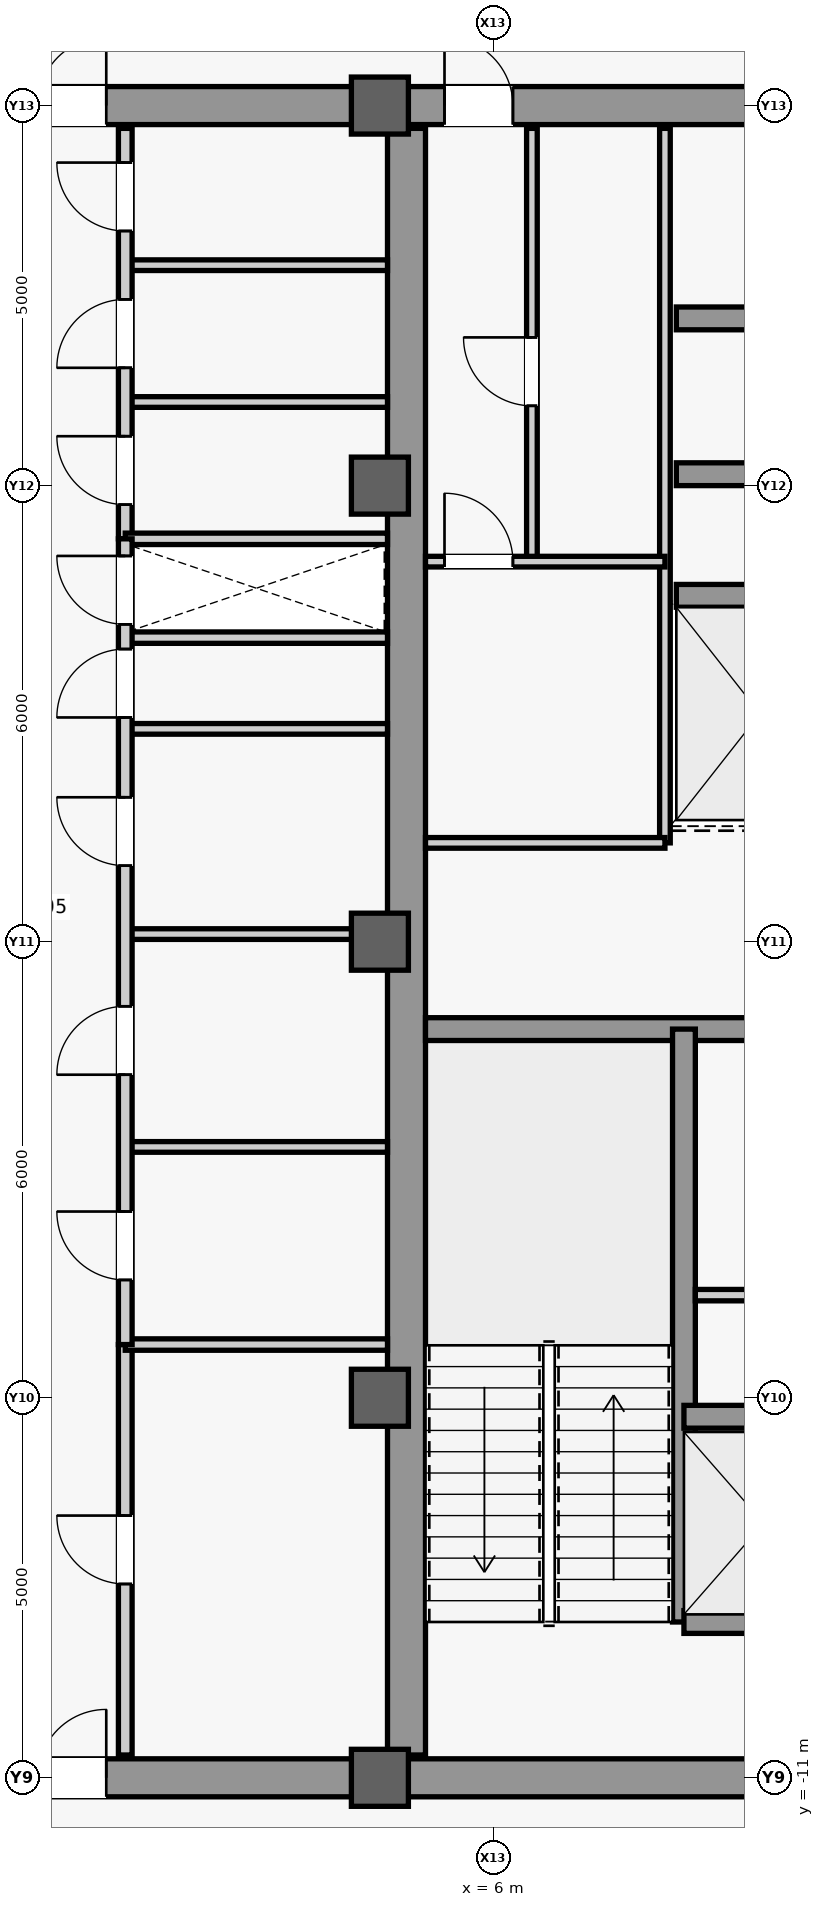
"""IFC4 building model, lengths in metres.
Left out: names, types, materials, properties, quantities, classifications, styles, units other than length and angle.
Written with IfcOpenShell. Run it as: python <this file> out.ifc"""

import sys

from ifc_helpers import new_model, si_unit, direction, frame, frame_2d, origin, origin_2d, place, context, subcontext, project, spatial, rectangle, extrude, source, transform, mapped, element, fill, save


model = new_model("IFC4")
c1 = context("Model", 3, precision=1e-05, world=origin(), true_north=direction((0.0, 1.0)))
c2 = subcontext(c1, "Body", "Model", "MODEL_VIEW")
j1 = project(units=[si_unit("LENGTHUNIT", "METRE"), si_unit("PLANEANGLEUNIT", "RADIAN")], contexts=[c1])
p1 = place(None, origin())
s1 = spatial("IfcSite", under=j1, at=p1, CompositionType="ELEMENT")
p2 = place(p1, origin())
s2 = spatial("IfcBuilding", under=s1, at=p2, CompositionType="ELEMENT")
p3 = place(p2, frame((0.0, 0.0, 380.3)))
s3 = spatial("IfcBuildingStorey", under=s2, at=p3, CompositionType="ELEMENT", Elevation=380.3)
m1 = source(origin(), c2, "Body", "SweptSolid", [
    extrude(rectangle(XDim=21.4, YDim=0.5, at=frame_2d((10.7, 0.0))), origin(), (0.0, 0.0, 1.0), 4.45),
])
p4 = place(p3, frame((4.85, -10.7, 0.0), z_axis=(0.0, 0.0, 1.0), x_axis=(0.0, 1.0, 0.0)))
e1 = element("IfcWall", 1, at=p4, inside=s3, PredefinedType="SHEAR", context=c2, shape_type="MappedRepresentation", body=[
    mapped(m1, transform((0.0, 0.0, 0.0), scale=1.0)),
])
m2 = source(origin(), c2, "Body", "SweptSolid", [
    extrude(rectangle(XDim=5.9, YDim=0.5, at=frame_2d((2.95, 0.0))), origin(), (0.0, 0.0, 1.0), 4.45),
])
p5 = place(p3, frame((4.85, -11.0, 0.0), z_axis=(0.0, 0.0, 1.0), x_axis=(1.0, 0.0, 0.0)))
e2 = element("IfcWall", 2, at=p5, inside=s3, PredefinedType="SHEAR", context=c2, shape_type="MappedRepresentation", body=[
    mapped(m2, transform((0.0, 0.0, 0.0), scale=1.0)),
])
p6 = place(p3, frame((4.85, 11.0, 0.0), z_axis=(0.0, 0.0, 1.0), x_axis=(1.0, 0.0, 0.0)))
e3 = element("IfcWall", 3, at=p6, inside=s3, PredefinedType="SHEAR", context=c2, shape_type="MappedRepresentation", body=[
    mapped(m2, transform((0.0, 0.0, 0.0), scale=1.0)),
])
m3 = source(origin(), c2, "Body", "SweptSolid", [
    extrude(rectangle(XDim=0.9, YDim=2.15, at=frame_2d((0.45, 1.075))), frame((0.0, 0.26, 0.0), z_axis=(0.0, -1.0, 0.0), x_axis=(1.0, 0.0, 0.0)), (0.0, 0.0, 1.0), 0.52),
])
p7 = place(p6, frame((0.5, 0.0, 0.0)))
e4 = element("IfcOpeningElement", 4, at=p7, cuts=e3, PredefinedType="OPENING", context=c2, shape_type="MappedRepresentation", body=[
    mapped(m3, transform((0.0, 0.0, 0.0), scale=1.0)),
])
m4 = source(origin(), c2, "Body", "SweptSolid", [
    extrude(rectangle(XDim=5.65, YDim=0.3, at=frame_2d((2.825, 0.0))), origin(), (0.0, 0.0, 1.0), 4.45),
])
p8 = place(p3, frame((5.1, -1.15, 0.0), z_axis=(0.0, 0.0, 1.0), x_axis=(1.0, 0.0, 0.0)))
e5 = element("IfcWall", 5, at=p8, inside=s3, PredefinedType="SHEAR", context=c2, shape_type="MappedRepresentation", body=[
    mapped(m4, transform((0.0, 0.0, 0.0), scale=1.0)),
])
m5 = source(origin(), c2, "Body", "SweptSolid", [
    extrude(rectangle(XDim=9.2, YDim=0.5, at=frame_2d((4.6, 0.0))), origin(), (0.0, 0.0, 1.0), 4.45),
])
p9 = place(p3, frame((-4.6, -11.0, 0.0), z_axis=(0.0, 0.0, 1.0), x_axis=(1.0, 0.0, 0.0)))
e6 = element("IfcWall", 6, at=p9, inside=s3, PredefinedType="SHEAR", context=c2, shape_type="MappedRepresentation", body=[
    mapped(m5, transform((0.0, 0.0, 0.0), scale=1.0)),
])
m6 = source(origin(), c2, "Body", "SweptSolid", [
    extrude(rectangle(XDim=1.8, YDim=2.25, at=frame_2d((0.9, 1.125))), frame((0.0, 0.26, 0.0), z_axis=(0.0, -1.0, 0.0), x_axis=(1.0, 0.0, 0.0)), (0.0, 0.0, 1.0), 0.52),
])
p10 = place(p9, frame((3.7, 0.0, 0.0)))
e7 = element("IfcOpeningElement", 7, at=p10, cuts=e6, PredefinedType="OPENING", context=c2, shape_type="MappedRepresentation", body=[
    mapped(m6, transform((0.0, 0.0, 0.0), scale=1.0)),
])
p11 = place(p3, frame((-4.6, 11.0, 0.0), z_axis=(0.0, 0.0, 1.0), x_axis=(1.0, 0.0, 0.0)))
e8 = element("IfcWall", 8, at=p11, inside=s3, PredefinedType="SHEAR", context=c2, shape_type="MappedRepresentation", body=[
    mapped(m5, transform((0.0, 0.0, 0.0), scale=1.0)),
])
p12 = place(p11, frame((3.7, 0.0, 0.0)))
e9 = element("IfcOpeningElement", 9, at=p12, cuts=e8, PredefinedType="OPENING", context=c2, shape_type="MappedRepresentation", body=[
    mapped(m6, transform((0.0, 0.0, 0.0), scale=1.0)),
])
m7 = source(origin(), c2, "Body", "SweptSolid", [
    extrude(rectangle(XDim=0.75, YDim=0.75, at=origin_2d()), origin(), (0.0, 0.0, 1.0), 4.8),
])
for number, where, z_axis, x_axis in (
    (10, (4.5, -11.0, 0.0), (0.0, 0.0, 1.0), (1.0, 0.0, 0.0)),
    (11, (4.5, -6.0, 0.0), (0.0, 0.0, 1.0), (1.0, 0.0, 0.0)),
    (12, (4.5, 0.0, 0.0), (0.0, 0.0, 1.0), (1.0, 0.0, 0.0)),
    (13, (4.5, 6.0, 0.0), (0.0, 0.0, 1.0), (1.0, 0.0, 0.0)),
    (14, (4.5, 11.0, 0.0), (0.0, 0.0, 1.0), (1.0, 0.0, 0.0)),
):
    element("IfcColumn", number, at=place(p3, frame(where, z_axis=z_axis, x_axis=x_axis)), inside=s3, PredefinedType="COLUMN", context=c2, shape_type="MappedRepresentation", body=[
        mapped(m7, transform((0.0, 0.0, 0.0), scale=1.0)),
    ])
m8 = source(origin(), c2, "Body", "SweptSolid", [
    extrude(rectangle(XDim=7.8, YDim=0.3, at=frame_2d((3.9, 0.0))), origin(), (0.0, 0.0, 1.0), 4.45),
])
p13 = place(p3, frame((8.5, -8.95, 0.0), z_axis=(0.0, 0.0, 1.0), x_axis=(0.0, 1.0, 0.0)))
e15 = element("IfcWall", 15, at=p13, inside=s3, PredefinedType="SHEAR", context=c2, shape_type="MappedRepresentation", body=[
    mapped(m8, transform((0.0, 0.0, 0.0), scale=1.0)),
])
m9 = source(origin(), c2, "Body", "SweptSolid", [
    extrude(rectangle(XDim=2.2, YDim=0.3, at=frame_2d((1.1, 0.0))), origin(), (0.0, 0.0, 1.0), 4.45),
])
for number, where, z_axis, x_axis in (
    (16, (8.5, -8.95, 0.0), (0.0, 0.0, 1.0), (1.0, 0.0, 0.0)),
    (17, (8.5, -6.25, 0.0), (0.0, 0.0, 1.0), (1.0, 0.0, 0.0)),
):
    element("IfcWall", number, at=place(p3, frame(where, z_axis=z_axis, x_axis=x_axis)), inside=s3, PredefinedType="SHEAR", context=c2, shape_type="MappedRepresentation", body=[
        mapped(m9, transform((0.0, 0.0, 0.0), scale=1.0)),
    ])
m10 = source(origin(), c2, "Body", "SweptSolid", [
    extrude(rectangle(XDim=2.3, YDim=0.3, at=frame_2d((1.15, 0.0))), origin(), (0.0, 0.0, 1.0), 4.45),
])
for number, where, z_axis, x_axis in (
    (18, (8.4, 4.55, 0.0), (0.0, 0.0, 1.0), (1.0, 0.0, 0.0)),
    (19, (8.4, 6.15, 0.0), (0.0, 0.0, 1.0), (1.0, 0.0, 0.0)),
    (20, (8.4, 8.2, 0.0), (0.0, 0.0, 1.0), (1.0, 0.0, 0.0)),
):
    element("IfcWall", number, at=place(p3, frame(where, z_axis=z_axis, x_axis=x_axis)), inside=s3, PredefinedType="SHEAR", context=c2, shape_type="MappedRepresentation", body=[
        mapped(m10, transform((0.0, 0.0, 0.0), scale=1.0)),
    ])
m11 = source(origin(), c2, "Body", "SweptSolid", [
    extrude(rectangle(XDim=2.05, YDim=0.15, at=frame_2d((1.025, 0.0))), origin(), (0.0, 0.0, 1.0), 4.45),
])
p14 = place(p3, frame((8.65, -4.65, 0.0), z_axis=(0.0, 0.0, 1.0), x_axis=(1.0, 0.0, 0.0)))
e21 = element("IfcWall", 21, at=p14, inside=s3, PredefinedType="PARTITIONING", context=c2, shape_type="MappedRepresentation", body=[
    mapped(m11, transform((0.0, 0.0, 0.0), scale=1.0)),
])
m12 = source(origin(), c2, "Body", "SweptSolid", [
    extrude(rectangle(XDim=9.4, YDim=0.14, at=frame_2d((4.7, 0.0))), origin(), (0.0, 0.0, 1.0), 4.45),
])
p15 = place(p3, frame((8.25, 1.3, 0.0), z_axis=(0.0, 0.0, 1.0), x_axis=(0.0, 1.0, 0.0)))
e22 = element("IfcWall", 22, at=p15, inside=s3, PredefinedType="PARTITIONING", context=c2, shape_type="MappedRepresentation", body=[
    mapped(m12, transform((0.0, 0.0, 0.0), scale=1.0)),
])
m13 = source(origin(), c2, "Body", "SweptSolid", [
    extrude(rectangle(XDim=3.15, YDim=0.14, at=frame_2d((1.575, 0.0))), origin(), (0.0, 0.0, 1.0), 4.45),
])
p16 = place(p3, frame((5.1, 1.3, 0.0), z_axis=(0.0, 0.0, 1.0), x_axis=(1.0, 0.0, 0.0)))
e23 = element("IfcWall", 23, at=p16, inside=s3, PredefinedType="PARTITIONING", context=c2, shape_type="MappedRepresentation", body=[
    mapped(m13, transform((0.0, 0.0, 0.0), scale=1.0)),
])
m14 = source(origin(), c2, "Body", "SweptSolid", [
    extrude(rectangle(XDim=5.7, YDim=0.14, at=frame_2d((2.85, 0.0))), origin(), (0.0, 0.0, 1.0), 4.45),
])
p17 = place(p3, frame((6.5, 5.0, 0.0), z_axis=(0.0, 0.0, 1.0), x_axis=(0.0, 1.0, 0.0)))
e24 = element("IfcWall", 24, at=p17, inside=s3, PredefinedType="PARTITIONING", context=c2, shape_type="MappedRepresentation", body=[
    mapped(m14, transform((0.0, 0.0, 0.0), scale=1.0)),
])
m15 = source(origin(), c2, "Body", "SweptSolid", [
    extrude(rectangle(XDim=0.9, YDim=2.15, at=frame_2d((0.45, 1.075))), frame((0.0, 0.08, 0.0), z_axis=(0.0, -1.0, 0.0), x_axis=(1.0, 0.0, 0.0)), (0.0, 0.0, 1.0), 0.16),
])
p18 = place(p17, frame((2.05, 0.0, 0.0)))
e25 = element("IfcOpeningElement", 25, at=p18, cuts=e24, PredefinedType="OPENING", context=c2, shape_type="MappedRepresentation", body=[
    mapped(m15, transform((0.0, 0.0, 0.0), scale=1.0)),
])
p19 = place(p3, frame((5.1, 5.0, 0.0), z_axis=(0.0, 0.0, 1.0), x_axis=(1.0, 0.0, 0.0)))
e26 = element("IfcWall", 26, at=p19, inside=s3, PredefinedType="PARTITIONING", context=c2, shape_type="MappedRepresentation", body=[
    mapped(m13, transform((0.0, 0.0, 0.0), scale=1.0)),
])
p20 = place(p19, frame((0.25, 0.0, 0.0)))
e27 = element("IfcOpeningElement", 27, at=p20, cuts=e26, PredefinedType="OPENING", context=c2, shape_type="MappedRepresentation", body=[
    mapped(m15, transform((0.0, 0.0, 0.0), scale=1.0)),
])
m16 = source(origin(), c2, "Body", "SweptSolid", [
    extrude(rectangle(XDim=3.45, YDim=0.15, at=frame_2d((1.725, 0.0))), origin(), (0.0, 0.0, 1.0), 4.45),
])
p21 = place(p3, frame((1.15, 4.0, 0.0), z_axis=(0.0, 0.0, 1.0), x_axis=(1.0, 0.0, 0.0)))
e28 = element("IfcWall", 28, at=p21, inside=s3, PredefinedType="PARTITIONING", context=c2, shape_type="MappedRepresentation", body=[
    mapped(m16, transform((0.0, 0.0, 0.0), scale=1.0)),
])
m17 = source(origin(), c2, "Body", "SweptSolid", [
    extrude(rectangle(XDim=5.4, YDim=0.18, at=frame_2d((2.7, 0.0))), origin(), (0.0, 0.0, 1.0), 4.45),
])
p22 = place(p3, frame((1.15, -10.7, 0.0), z_axis=(0.0, 0.0, 1.0), x_axis=(0.0, 1.0, 0.0)))
e29 = element("IfcWall", 29, at=p22, inside=s3, PredefinedType="PARTITIONING", context=c2, shape_type="MappedRepresentation", body=[
    mapped(m17, transform((0.0, 0.0, 0.0), scale=1.0)),
])
m18 = source(origin(), c2, "Body", "SweptSolid", [
    extrude(rectangle(XDim=0.9, YDim=2.15, at=frame_2d((0.45, 1.075))), frame((0.0, 0.1, 0.0), z_axis=(0.0, -1.0, 0.0), x_axis=(1.0, 0.0, 0.0)), (0.0, 0.0, 1.0), 0.2),
])
p23 = place(p22, frame((2.25, 0.0, 0.0)))
e30 = element("IfcOpeningElement", 30, at=p23, cuts=e29, PredefinedType="OPENING", context=c2, shape_type="MappedRepresentation", body=[
    mapped(m18, transform((0.0, 0.0, 0.0), scale=1.0)),
])
p24 = place(p3, frame((1.15, -5.3, 0.0), z_axis=(0.0, 0.0, 1.0), x_axis=(1.0, 0.0, 0.0)))
e31 = element("IfcWall", 31, at=p24, inside=s3, PredefinedType="PARTITIONING", context=c2, shape_type="MappedRepresentation", body=[
    mapped(m16, transform((0.0, 0.0, 0.0), scale=1.0)),
])
m19 = source(origin(), c2, "Body", "SweptSolid", [
    extrude(rectangle(XDim=3.45, YDim=0.14, at=frame_2d((1.725, 0.0))), origin(), (0.0, 0.0, 1.0), 4.45),
])
for number, where, z_axis, x_axis in (
    (32, (1.15, 7.1, 0.0), (0.0, 0.0, 1.0), (1.0, 0.0, 0.0)),
    (33, (1.15, 8.9, 0.0), (0.0, 0.0, 1.0), (1.0, 0.0, 0.0)),
):
    element("IfcWall", number, at=place(p3, frame(where, z_axis=z_axis, x_axis=x_axis)), inside=s3, PredefinedType="PARTITIONING", context=c2, shape_type="MappedRepresentation", body=[
        mapped(m19, transform((0.0, 0.0, 0.0), scale=1.0)),
    ])
p25 = place(p3, frame((1.15, 5.3, 0.0), z_axis=(0.0, 0.0, 1.0), x_axis=(0.0, 1.0, 0.0)))
e34 = element("IfcWall", 34, at=p25, inside=s3, PredefinedType="PARTITIONING", context=c2, shape_type="MappedRepresentation", body=[
    mapped(m17, transform((0.0, 0.0, 0.0), scale=1.0)),
])
p26 = place(p25, frame((0.45, 0.0, 0.0)))
e35 = element("IfcOpeningElement", 35, at=p26, cuts=e34, PredefinedType="OPENING", context=c2, shape_type="MappedRepresentation", body=[
    mapped(m18, transform((0.0, 0.0, 0.0), scale=1.0)),
])
p27 = place(p25, frame((2.25, 0.0, 0.0)))
e36 = element("IfcOpeningElement", 36, at=p27, cuts=e34, PredefinedType="OPENING", context=c2, shape_type="MappedRepresentation", body=[
    mapped(m18, transform((0.0, 0.0, 0.0), scale=1.0)),
])
p28 = place(p25, frame((4.05, 0.0, 0.0)))
e37 = element("IfcOpeningElement", 37, at=p28, cuts=e34, PredefinedType="OPENING", context=c2, shape_type="MappedRepresentation", body=[
    mapped(m18, transform((0.0, 0.0, 0.0), scale=1.0)),
])
p29 = place(p3, frame((1.15, 5.3, 0.0), z_axis=(0.0, 0.0, 1.0), x_axis=(1.0, 0.0, 0.0)))
e38 = element("IfcWall", 38, at=p29, inside=s3, PredefinedType="PARTITIONING", context=c2, shape_type="MappedRepresentation", body=[
    mapped(m16, transform((0.0, 0.0, 0.0), scale=1.0)),
])
p30 = place(p3, frame((1.15, -2.7, 0.0), z_axis=(0.0, 0.0, 1.0), x_axis=(1.0, 0.0, 0.0)))
e39 = element("IfcWall", 39, at=p30, inside=s3, PredefinedType="PARTITIONING", context=c2, shape_type="MappedRepresentation", body=[
    mapped(m19, transform((0.0, 0.0, 0.0), scale=1.0)),
])
m20 = source(origin(), c2, "Body", "SweptSolid", [
    extrude(rectangle(XDim=3.45, YDim=0.14, at=frame_2d((1.725, 0.0))), origin(), (0.0, 0.0, 1.0), 3.755),
])
p31 = place(p3, frame((1.15, 0.1, 0.0), z_axis=(0.0, 0.0, 1.0), x_axis=(1.0, 0.0, 0.0)))
e40 = element("IfcWall", 40, at=p31, inside=s3, PredefinedType="PARTITIONING", context=c2, shape_type="MappedRepresentation", body=[
    mapped(m20, transform((0.0, 0.0, 0.0), scale=1.0)),
])
p32 = place(p3, frame((1.15, 2.8, 0.0), z_axis=(0.0, 0.0, 1.0), x_axis=(1.0, 0.0, 0.0)))
e41 = element("IfcWall", 41, at=p32, inside=s3, PredefinedType="PARTITIONING", context=c2, shape_type="MappedRepresentation", body=[
    mapped(m19, transform((0.0, 0.0, 0.0), scale=1.0)),
])
m21 = source(origin(), c2, "Body", "SweptSolid", [
    extrude(rectangle(XDim=10.6, YDim=0.18, at=frame_2d((5.3, 0.0))), origin(), (0.0, 0.0, 1.0), 4.45),
])
p33 = place(p3, frame((1.15, -5.3, 0.0), z_axis=(0.0, 0.0, 1.0), x_axis=(0.0, 1.0, 0.0)))
e42 = element("IfcWall", 42, at=p33, inside=s3, PredefinedType="PARTITIONING", context=c2, shape_type="MappedRepresentation", body=[
    mapped(m21, transform((0.0, 0.0, 0.0), scale=1.0)),
])
p34 = place(p33, frame((0.85, 0.0, 0.0)))
e43 = element("IfcOpeningElement", 43, at=p34, cuts=e42, PredefinedType="OPENING", context=c2, shape_type="MappedRepresentation", body=[
    mapped(m18, transform((0.0, 0.0, 0.0), scale=1.0)),
])
p35 = place(p33, frame((3.55, 0.0, 0.0)))
e44 = element("IfcOpeningElement", 44, at=p35, cuts=e42, PredefinedType="OPENING", context=c2, shape_type="MappedRepresentation", body=[
    mapped(m18, transform((0.0, 0.0, 0.0), scale=1.0)),
])
p36 = place(p33, frame((6.3, 0.0, 0.0)))
e45 = element("IfcOpeningElement", 45, at=p36, cuts=e42, PredefinedType="OPENING", context=c2, shape_type="MappedRepresentation", body=[
    mapped(m18, transform((0.0, 0.0, 0.0), scale=1.0)),
])
p37 = place(p33, frame((8.25, 0.0, 0.0)))
e46 = element("IfcOpeningElement", 46, at=p37, cuts=e42, PredefinedType="OPENING", context=c2, shape_type="MappedRepresentation", body=[
    mapped(m18, transform((0.0, 0.0, 0.0), scale=1.0)),
])
p38 = place(p33, frame((9.475, 0.0, 0.0)))
e47 = element("IfcOpeningElement", 47, at=p38, cuts=e42, PredefinedType="OPENING", context=c2, shape_type="MappedRepresentation", body=[
    mapped(m18, transform((0.0, 0.0, 0.0), scale=1.0)),
])
m22 = source(origin(), c2, "Body", "SweptSolid", [
    extrude(rectangle(XDim=0.9, YDim=2.15, at=frame_2d((0.45, 1.075))), frame((0.0, 0.025, 0.0), z_axis=(0.0, -1.0, 0.0), x_axis=(1.0, 0.0, 0.0)), (0.0, 0.0, 1.0), 0.05),
])
p39 = place(p7, origin())
e48 = element("IfcDoor", 48, at=p39, inside=s3, OperationType="SINGLE_SWING_LEFT", PredefinedType="DOOR", context=c2, shape_type="MappedRepresentation", body=[
    mapped(m22, transform((0.0, 0.0, 0.0), scale=1.0)),
])
fill(e4, e48)
p40 = place(p18, origin())
e49 = element("IfcDoor", 49, at=p40, inside=s3, OperationType="SINGLE_SWING_RIGHT", PredefinedType="DOOR", context=c2, shape_type="MappedRepresentation", body=[
    mapped(m22, transform((0.0, 0.0, 0.0), scale=1.0)),
])
fill(e25, e49)
p41 = place(p20, origin())
e50 = element("IfcDoor", 50, at=p41, inside=s3, OperationType="SINGLE_SWING_LEFT", PredefinedType="DOOR", context=c2, shape_type="MappedRepresentation", body=[
    mapped(m22, transform((0.0, 0.0, 0.0), scale=1.0)),
])
fill(e27, e50)
p42 = place(p23, origin())
e51 = element("IfcDoor", 51, at=p42, inside=s3, OperationType="SINGLE_SWING_RIGHT", PredefinedType="DOOR", context=c2, shape_type="MappedRepresentation", body=[
    mapped(m22, transform((0.0, 0.0, 0.0), scale=1.0)),
])
fill(e30, e51)
m23 = source(origin(), c2, "Body", "SweptSolid", [
    extrude(rectangle(XDim=1.8, YDim=2.25, at=frame_2d((0.9, 1.125))), frame((0.0, 0.025, 0.0), z_axis=(0.0, -1.0, 0.0), x_axis=(1.0, 0.0, 0.0)), (0.0, 0.0, 1.0), 0.05),
])
p43 = place(p10, origin())
e52 = element("IfcDoor", 52, at=p43, inside=s3, OperationType="SINGLE_SWING_LEFT", PredefinedType="DOOR", context=c2, shape_type="MappedRepresentation", body=[
    mapped(m23, transform((0.0, 0.0, 0.0), scale=1.0)),
])
fill(e7, e52)
p44 = place(p26, origin())
e53 = element("IfcDoor", 53, at=p44, inside=s3, OperationType="SINGLE_SWING_RIGHT", PredefinedType="DOOR", context=c2, shape_type="MappedRepresentation", body=[
    mapped(m22, transform((0.0, 0.0, 0.0), scale=1.0)),
])
fill(e35, e53)
p45 = place(p27, origin())
e54 = element("IfcDoor", 54, at=p45, inside=s3, OperationType="SINGLE_SWING_LEFT", PredefinedType="DOOR", context=c2, shape_type="MappedRepresentation", body=[
    mapped(m22, transform((0.0, 0.0, 0.0), scale=1.0)),
])
fill(e36, e54)
p46 = place(p28, origin())
e55 = element("IfcDoor", 55, at=p46, inside=s3, OperationType="SINGLE_SWING_RIGHT", PredefinedType="DOOR", context=c2, shape_type="MappedRepresentation", body=[
    mapped(m22, transform((0.0, 0.0, 0.0), scale=1.0)),
])
fill(e37, e55)
p47 = place(p12, origin())
e56 = element("IfcDoor", 56, at=p47, inside=s3, OperationType="SINGLE_SWING_RIGHT", PredefinedType="DOOR", context=c2, shape_type="MappedRepresentation", body=[
    mapped(m23, transform((0.0, 0.0, 0.0), scale=1.0)),
])
fill(e9, e56)
p48 = place(p34, origin())
e57 = element("IfcDoor", 57, at=p48, inside=s3, OperationType="SINGLE_SWING_RIGHT", PredefinedType="DOOR", context=c2, shape_type="MappedRepresentation", body=[
    mapped(m22, transform((0.0, 0.0, 0.0), scale=1.0)),
])
fill(e43, e57)
p49 = place(p35, origin())
e58 = element("IfcDoor", 58, at=p49, inside=s3, OperationType="SINGLE_SWING_LEFT", PredefinedType="DOOR", context=c2, shape_type="MappedRepresentation", body=[
    mapped(m22, transform((0.0, 0.0, 0.0), scale=1.0)),
])
fill(e44, e58)
p50 = place(p36, origin())
e59 = element("IfcDoor", 59, at=p50, inside=s3, OperationType="SINGLE_SWING_RIGHT", PredefinedType="DOOR", context=c2, shape_type="MappedRepresentation", body=[
    mapped(m22, transform((0.0, 0.0, 0.0), scale=1.0)),
])
fill(e45, e59)
p51 = place(p37, origin())
e60 = element("IfcDoor", 60, at=p51, inside=s3, OperationType="SINGLE_SWING_LEFT", PredefinedType="DOOR", context=c2, shape_type="MappedRepresentation", body=[
    mapped(m22, transform((0.0, 0.0, 0.0), scale=1.0)),
])
fill(e46, e60)
p52 = place(p38, origin())
e61 = element("IfcDoor", 61, at=p52, inside=s3, OperationType="SINGLE_SWING_RIGHT", PredefinedType="DOOR", context=c2, shape_type="MappedRepresentation", body=[
    mapped(m22, transform((0.0, 0.0, 0.0), scale=1.0)),
])
fill(e47, e61)
save(model, sys.argv[1])
